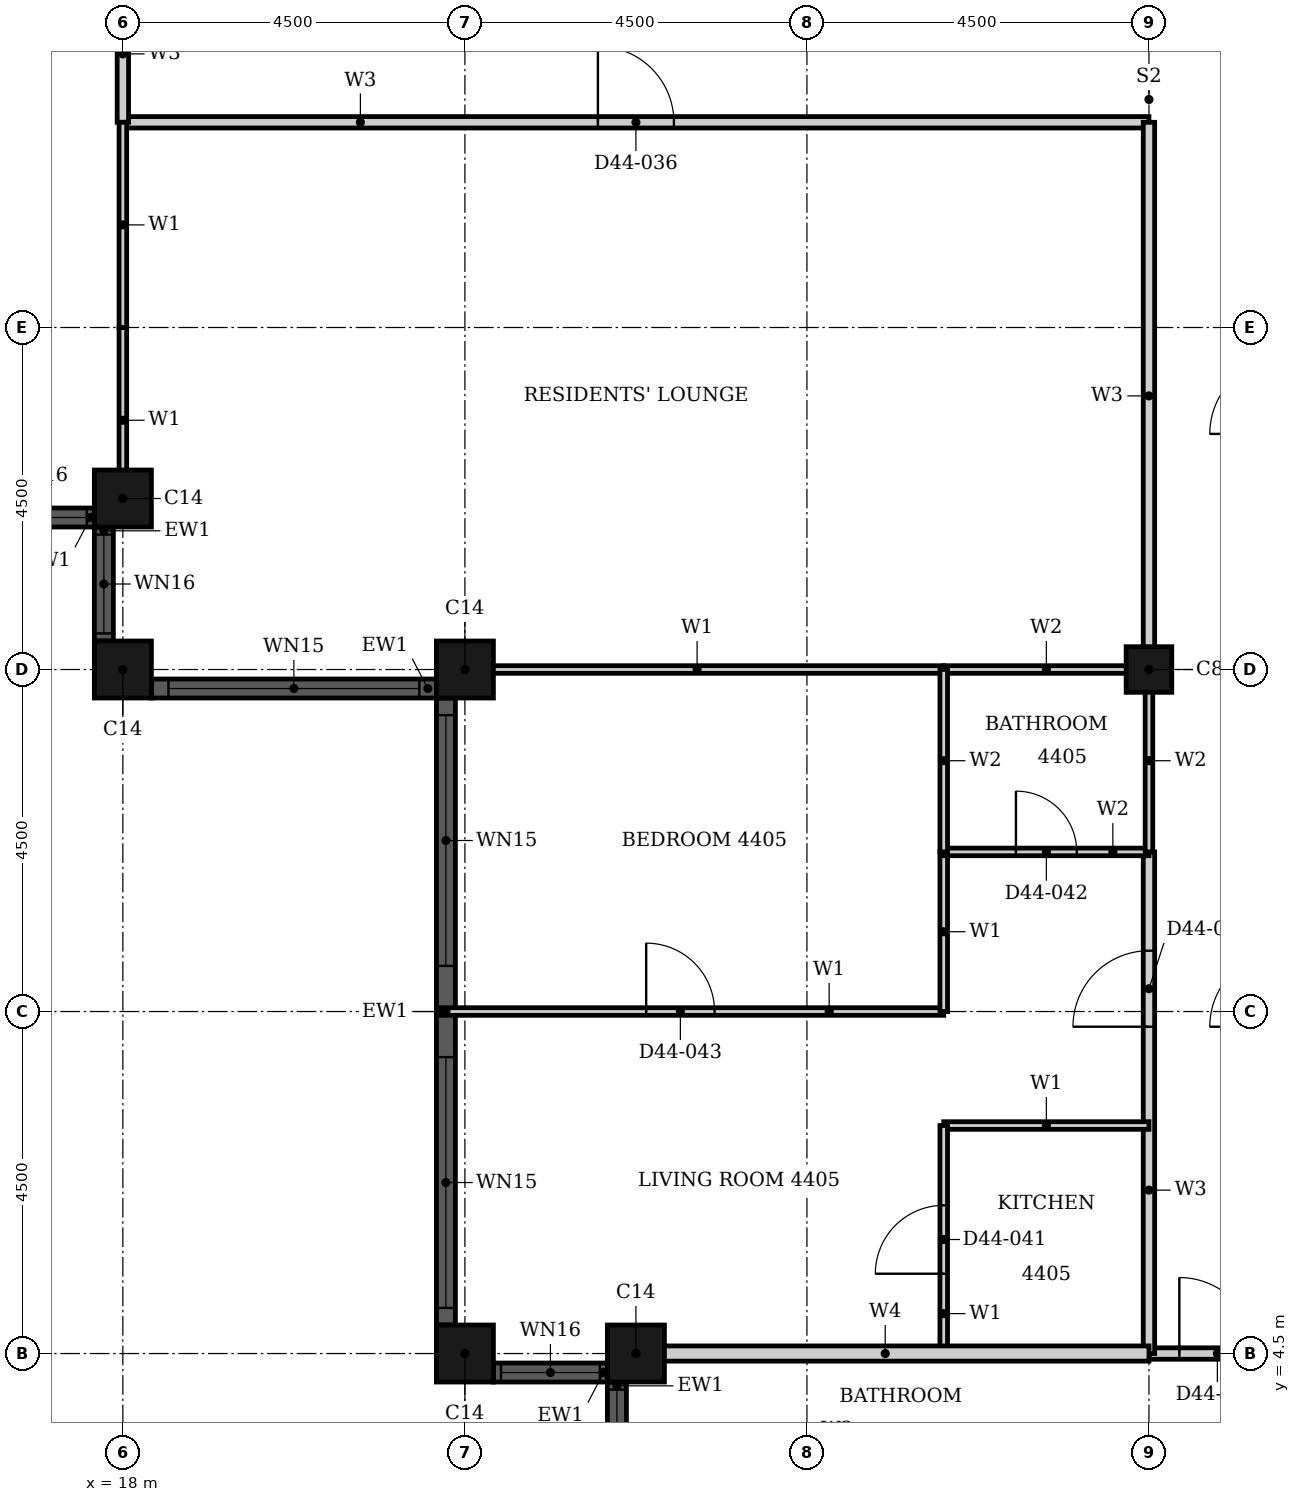
"""IFC4 building model, lengths in metres.
Left out: names, types, materials, properties, quantities, classifications, styles, units other than length and angle.
Written with IfcOpenShell. Run it as: python <this file> out.ifc"""

import sys

from ifc_helpers import new_model, si_unit, direction, frame, frame_2d, origin, origin_2d, place, context, subcontext, project, spatial, rectangle, hollow_rectangle, extrude, element, fill, save


model = new_model("IFC4")
c1 = context("Model", 3, precision=1e-05, world=origin(), true_north=direction((0.0, 1.0)))
c2 = subcontext(c1, "Body", "Model", "MODEL_VIEW")
j1 = project(units=[si_unit("LENGTHUNIT", "METRE"), si_unit("PLANEANGLEUNIT", "RADIAN")], contexts=[c1])
p1 = place(None, origin())
s1 = spatial("IfcSite", under=j1, at=p1, CompositionType="ELEMENT")
p2 = place(p1, origin())
s2 = spatial("IfcBuilding", under=s1, at=p2, CompositionType="ELEMENT")
p3 = place(p2, frame((0.0, 0.0, 176.5)))
s3 = spatial("IfcBuildingStorey", under=s2, at=p3, CompositionType="ELEMENT", Elevation=176.5)
for number, where, z_axis, x_axis in (
    (1, (22.5, 4.5, 0.0), (0.0, 0.0, 1.0), (1.0, 0.0, 0.0)),
    (2, (24.75, 4.5, 0.0), (0.0, 0.0, 1.0), (1.0, 0.0, 0.0)),
    (3, (18.0, 15.75, 0.0), (0.0, 0.0, 1.0), (1.0, 0.0, 0.0)),
    (4, (18.0, 13.5, 0.0), (0.0, 0.0, 1.0), (1.0, 0.0, 0.0)),
    (5, (22.5, 13.5, 0.0), (0.0, 0.0, 1.0), (1.0, 0.0, 0.0)),
):
    element("IfcColumn", number, at=place(p3, frame(where, z_axis=z_axis, x_axis=x_axis)), inside=s3, PredefinedType="COLUMN", context=c2, shape_type="SweptSolid", body=[
        extrude(hollow_rectangle(XDim=0.75, YDim=0.75, WallThickness=0.024, at=origin_2d()), origin(), (0.0, 0.0, 1.0), 3.7),
    ])
p4 = place(p3, frame((31.5, 13.5, 0.0), z_axis=(0.0, 0.0, 1.0), x_axis=(1.0, 0.0, 0.0)))
e6 = element("IfcColumn", 6, at=p4, inside=s3, PredefinedType="COLUMN", context=c2, shape_type="SweptSolid", body=[
    extrude(hollow_rectangle(XDim=0.6, YDim=0.6, WallThickness=0.02, at=origin_2d()), origin(), (0.0, 0.0, 1.0), 3.7),
])
p5 = place(p3, frame((22.875, 4.25, 0.0), z_axis=(0.0, 0.0, 1.0), x_axis=(1.0, 0.0, 0.0)))
e7 = element("IfcWall", 7, at=p5, inside=s3, PredefinedType="SOLIDWALL", context=c2, shape_type="SweptSolid", body=[
    extrude(rectangle(XDim=1.5, YDim=0.25, at=frame_2d((0.75, 0.0))), origin(), (0.0, 0.0, 1.0), 3.7),
])
p6 = place(p5, frame((0.1, 0.0, 0.9)))
e8 = element("IfcOpeningElement", 8, at=p6, cuts=e7, PredefinedType="OPENING", context=c2, shape_type="SweptSolid", body=[
    extrude(rectangle(XDim=1.3, YDim=1.85, at=frame_2d((0.65, 0.925))), frame((0.0, 0.135, 0.0), z_axis=(0.0, -1.0, 0.0), x_axis=(1.0, 0.0, 0.0)), (0.0, 0.0, 1.0), 0.27),
])
p7 = place(p3, frame((24.5, 4.125, 0.0), z_axis=(0.0, 0.0, 1.0), x_axis=(0.0, -1.0, 0.0)))
e9 = element("IfcWall", 9, at=p7, inside=s3, PredefinedType="SOLIDWALL", context=c2, shape_type="SweptSolid", body=[
    extrude(rectangle(XDim=1.5, YDim=0.25, at=frame_2d((0.75, 0.0))), origin(), (0.0, 0.0, 1.0), 3.7),
])
p8 = place(p7, frame((0.1, 0.0, 0.9)))
e10 = element("IfcOpeningElement", 10, at=p8, cuts=e9, PredefinedType="OPENING", context=c2, shape_type="SweptSolid", body=[
    extrude(rectangle(XDim=1.3, YDim=1.85, at=frame_2d((0.65, 0.925))), frame((0.0, 0.135, 0.0), z_axis=(0.0, -1.0, 0.0), x_axis=(1.0, 0.0, 0.0)), (0.0, 0.0, 1.0), 0.27),
])
p9 = place(p3, frame((16.125, 15.5, 0.0), z_axis=(0.0, 0.0, 1.0), x_axis=(1.0, 0.0, 0.0)))
e11 = element("IfcWall", 11, at=p9, inside=s3, PredefinedType="SOLIDWALL", context=c2, shape_type="SweptSolid", body=[
    extrude(rectangle(XDim=1.5, YDim=0.25, at=frame_2d((0.75, 0.0))), origin(), (0.0, 0.0, 1.0), 3.7),
])
p10 = place(p9, frame((0.1, 0.0, 0.9)))
e12 = element("IfcOpeningElement", 12, at=p10, cuts=e11, PredefinedType="OPENING", context=c2, shape_type="SweptSolid", body=[
    extrude(rectangle(XDim=1.3, YDim=1.85, at=frame_2d((0.65, 0.925))), frame((0.0, 0.135, 0.0), z_axis=(0.0, -1.0, 0.0), x_axis=(1.0, 0.0, 0.0)), (0.0, 0.0, 1.0), 0.27),
])
p11 = place(p3, frame((17.75, 15.375, 0.0), z_axis=(0.0, 0.0, 1.0), x_axis=(0.0, -1.0, 0.0)))
e13 = element("IfcWall", 13, at=p11, inside=s3, PredefinedType="SOLIDWALL", context=c2, shape_type="SweptSolid", body=[
    extrude(rectangle(XDim=1.5, YDim=0.25, at=frame_2d((0.75, 0.0))), origin(), (0.0, 0.0, 1.0), 3.7),
])
p12 = place(p11, frame((0.1, 0.0, 0.9)))
e14 = element("IfcOpeningElement", 14, at=p12, cuts=e13, PredefinedType="OPENING", context=c2, shape_type="SweptSolid", body=[
    extrude(rectangle(XDim=1.3, YDim=1.85, at=frame_2d((0.65, 0.925))), frame((0.0, 0.135, 0.0), z_axis=(0.0, -1.0, 0.0), x_axis=(1.0, 0.0, 0.0)), (0.0, 0.0, 1.0), 0.27),
])
p13 = place(p3, frame((18.375, 13.25, 0.0), z_axis=(0.0, 0.0, 1.0), x_axis=(1.0, 0.0, 0.0)))
e15 = element("IfcWall", 15, at=p13, inside=s3, PredefinedType="SOLIDWALL", context=c2, shape_type="SweptSolid", body=[
    extrude(rectangle(XDim=3.75, YDim=0.25, at=frame_2d((1.875, 0.0))), origin(), (0.0, 0.0, 1.0), 3.7),
])
p14 = place(p13, frame((0.225, 0.0, 0.45)))
e16 = element("IfcOpeningElement", 16, at=p14, cuts=e15, PredefinedType="OPENING", context=c2, shape_type="SweptSolid", body=[
    extrude(rectangle(XDim=3.3, YDim=2.3, at=frame_2d((1.65, 1.15))), frame((0.0, 0.135, 0.0), z_axis=(0.0, -1.0, 0.0), x_axis=(1.0, 0.0, 0.0)), (0.0, 0.0, 1.0), 0.27),
])
p15 = place(p3, frame((22.25, 13.125, 0.0), z_axis=(0.0, 0.0, 1.0), x_axis=(0.0, -1.0, 0.0)))
e17 = element("IfcWall", 17, at=p15, inside=s3, PredefinedType="SOLIDWALL", context=c2, shape_type="SweptSolid", body=[
    extrude(rectangle(XDim=8.25, YDim=0.25, at=frame_2d((4.125, 0.0))), origin(), (0.0, 0.0, 1.0), 3.7),
])
p16 = place(p15, frame((0.225, 0.0, 0.45)))
e18 = element("IfcOpeningElement", 18, at=p16, cuts=e17, PredefinedType="OPENING", context=c2, shape_type="SweptSolid", body=[
    extrude(rectangle(XDim=3.3, YDim=2.3, at=frame_2d((1.65, 1.15))), frame((0.0, 0.135, 0.0), z_axis=(0.0, -1.0, 0.0), x_axis=(1.0, 0.0, 0.0)), (0.0, 0.0, 1.0), 0.27),
])
p17 = place(p15, frame((4.725, 0.0, 0.45)))
e19 = element("IfcOpeningElement", 19, at=p17, cuts=e17, PredefinedType="OPENING", context=c2, shape_type="SweptSolid", body=[
    extrude(rectangle(XDim=3.3, YDim=2.3, at=frame_2d((1.65, 1.15))), frame((0.0, 0.135, 0.0), z_axis=(0.0, -1.0, 0.0), x_axis=(1.0, 0.0, 0.0)), (0.0, 0.0, 1.0), 0.27),
])
p18 = place(p3, frame((18.0, 20.7, 0.0), z_axis=(0.0, 0.0, 1.0), x_axis=(1.0, 0.0, 0.0)))
e20 = element("IfcWall", 20, at=p18, inside=s3, PredefinedType="PARTITIONING", context=c2, shape_type="SweptSolid", body=[
    extrude(rectangle(XDim=13.5, YDim=0.15, at=frame_2d((6.75, 0.0))), origin(), (0.0, 0.0, 1.0), 3.4),
])
p19 = place(p18, frame((6.25, 0.0, 0.0)))
e21 = element("IfcOpeningElement", 21, at=p19, cuts=e20, PredefinedType="OPENING", context=c2, shape_type="SweptSolid", body=[
    extrude(rectangle(XDim=1.0, YDim=2.1, at=frame_2d((0.5, 1.05))), frame((0.0, 0.085, 0.0), z_axis=(0.0, -1.0, 0.0), x_axis=(1.0, 0.0, 0.0)), (0.0, 0.0, 1.0), 0.17),
])
p20 = place(p3, frame((31.5, 4.5, 0.0), z_axis=(0.0, 0.0, 1.0), x_axis=(1.0, 0.0, 0.0)))
e22 = element("IfcWall", 22, at=p20, inside=s3, PredefinedType="PARTITIONING", context=c2, shape_type="SweptSolid", body=[
    extrude(rectangle(XDim=1.8, YDim=0.15, at=frame_2d((0.9, 0.0))), origin(), (0.0, 0.0, 1.0), 3.4),
])
p21 = place(p20, frame((0.4, 0.0, 0.0)))
e23 = element("IfcOpeningElement", 23, at=p21, cuts=e22, PredefinedType="OPENING", context=c2, shape_type="SweptSolid", body=[
    extrude(rectangle(XDim=1.0, YDim=2.2, at=frame_2d((0.5, 1.1))), frame((0.0, 0.085, 0.0), z_axis=(0.0, -1.0, 0.0), x_axis=(1.0, 0.0, 0.0)), (0.0, 0.0, 1.0), 0.17),
])
p22 = place(p3, frame((18.0, 20.7, 0.0), z_axis=(0.0, 0.0, 1.0), x_axis=(0.0, 1.0, 0.0)))
e24 = element("IfcWall", 24, at=p22, inside=s3, PredefinedType="PARTITIONING", context=c2, shape_type="SweptSolid", body=[
    extrude(rectangle(XDim=1.8, YDim=0.15, at=frame_2d((0.9, 0.0))), origin(), (0.0, 0.0, 1.0), 3.4),
])
p23 = place(p3, frame((31.5, 4.5, 0.0), z_axis=(0.0, 0.0, 1.0), x_axis=(0.0, 1.0, 0.0)))
e25 = element("IfcWall", 25, at=p23, inside=s3, PredefinedType="PARTITIONING", context=c2, shape_type="SweptSolid", body=[
    extrude(rectangle(XDim=6.6, YDim=0.15, at=frame_2d((3.3, 0.0))), origin(), (0.0, 0.0, 1.0), 2.68),
])
p24 = place(p23, frame((4.3, 0.0, 0.0)))
e26 = element("IfcOpeningElement", 26, at=p24, cuts=e25, PredefinedType="OPENING", context=c2, shape_type="SweptSolid", body=[
    extrude(rectangle(XDim=1.0, YDim=2.2, at=frame_2d((0.5, 1.1))), frame((0.0, 0.085, 0.0), z_axis=(0.0, -1.0, 0.0), x_axis=(1.0, 0.0, 0.0)), (0.0, 0.0, 1.0), 0.17),
])
p25 = place(p3, frame((31.5, 13.5, 0.0), z_axis=(0.0, 0.0, 1.0), x_axis=(0.0, 1.0, 0.0)))
e27 = element("IfcWall", 27, at=p25, inside=s3, PredefinedType="PARTITIONING", context=c2, shape_type="SweptSolid", body=[
    extrude(rectangle(XDim=7.2, YDim=0.15, at=frame_2d((3.6, 0.0))), origin(), (0.0, 0.0, 1.0), 3.4),
])
p26 = place(p3, frame((22.31, 13.5, 0.0), z_axis=(0.0, 0.0, 1.0), x_axis=(1.0, 0.0, 0.0)))
e28 = element("IfcWall", 28, at=p26, inside=s3, PredefinedType="PARTITIONING", context=c2, shape_type="SweptSolid", body=[
    extrude(rectangle(XDim=6.49, YDim=0.1, at=frame_2d((3.245, 0.0))), origin(), (0.0, 0.0, 1.0), 2.48),
])
p27 = place(p3, frame((28.8, 7.5, 0.0), z_axis=(0.0, 0.0, 1.0), x_axis=(1.0, 0.0, 0.0)))
e29 = element("IfcWall", 29, at=p27, inside=s3, PredefinedType="PARTITIONING", context=c2, shape_type="SweptSolid", body=[
    extrude(rectangle(XDim=2.7, YDim=0.1, at=frame_2d((1.35, 0.0))), origin(), (0.0, 0.0, 1.0), 3.4),
])
p28 = place(p3, frame((22.185, 9.0, 0.0), z_axis=(0.0, 0.0, 1.0), x_axis=(1.0, 0.0, 0.0)))
e30 = element("IfcWall", 30, at=p28, inside=s3, PredefinedType="PARTITIONING", context=c2, shape_type="SweptSolid", body=[
    extrude(rectangle(XDim=6.615, YDim=0.1, at=frame_2d((3.308, 0.0))), origin(), (0.0, 0.0, 1.0), 3.4),
])
p29 = place(p28, frame((2.7, 0.0, 0.0)))
e31 = element("IfcOpeningElement", 31, at=p29, cuts=e30, PredefinedType="OPENING", context=c2, shape_type="SweptSolid", body=[
    extrude(rectangle(XDim=0.9, YDim=2.1, at=frame_2d((0.45, 1.05))), frame((0.0, 0.06, 0.0), z_axis=(0.0, -1.0, 0.0), x_axis=(1.0, 0.0, 0.0)), (0.0, 0.0, 1.0), 0.12),
])
p30 = place(p3, frame((18.0, 15.56, 0.0), z_axis=(0.0, 0.0, 1.0), x_axis=(0.0, 1.0, 0.0)))
e32 = element("IfcWall", 32, at=p30, inside=s3, PredefinedType="PARTITIONING", context=c2, shape_type="SweptSolid", body=[
    extrude(rectangle(XDim=2.439, YDim=0.1, at=frame_2d((1.219, 0.0))), origin(), (0.0, 0.0, 1.0), 3.4),
])
p31 = place(p3, frame((18.0, 18.0, 0.0), z_axis=(0.0, 0.0, 1.0), x_axis=(0.0, 1.0, 0.0)))
e33 = element("IfcWall", 33, at=p31, inside=s3, PredefinedType="PARTITIONING", context=c2, shape_type="SweptSolid", body=[
    extrude(rectangle(XDim=2.7, YDim=0.1, at=frame_2d((1.35, 0.0))), origin(), (0.0, 0.0, 1.0), 3.4),
])
p32 = place(p3, frame((28.8, 9.0, 0.0), z_axis=(0.0, 0.0, 1.0), x_axis=(0.0, 1.0, 0.0)))
e34 = element("IfcWall", 34, at=p32, inside=s3, PredefinedType="PARTITIONING", context=c2, shape_type="SweptSolid", body=[
    extrude(rectangle(XDim=2.1, YDim=0.1, at=frame_2d((1.05, 0.0))), origin(), (0.0, 0.0, 1.0), 3.4),
])
p33 = place(p3, frame((28.8, 4.5, 0.0), z_axis=(0.0, 0.0, 1.0), x_axis=(0.0, 1.0, 0.0)))
e35 = element("IfcWall", 35, at=p33, inside=s3, PredefinedType="PARTITIONING", context=c2, shape_type="SweptSolid", body=[
    extrude(rectangle(XDim=3.0, YDim=0.1, at=frame_2d((1.5, 0.0))), origin(), (0.0, 0.0, 1.0), 3.4),
])
p34 = place(p33, frame((1.05, 0.0, 0.0)))
e36 = element("IfcOpeningElement", 36, at=p34, cuts=e35, PredefinedType="OPENING", context=c2, shape_type="SweptSolid", body=[
    extrude(rectangle(XDim=0.9, YDim=2.1, at=frame_2d((0.45, 1.05))), frame((0.0, 0.06, 0.0), z_axis=(0.0, -1.0, 0.0), x_axis=(1.0, 0.0, 0.0)), (0.0, 0.0, 1.0), 0.12),
])
p35 = place(p3, frame((24.56, 4.5, 0.0), z_axis=(0.0, 0.0, 1.0), x_axis=(1.0, 0.0, 0.0)))
e37 = element("IfcWall", 37, at=p35, inside=s3, PredefinedType="PARTITIONING", context=c2, shape_type="SweptSolid", body=[
    extrude(rectangle(XDim=6.94, YDim=0.2, at=frame_2d((3.47, 0.0))), origin(), (0.0, 0.0, 1.0), 3.4),
])
p36 = place(p3, frame((28.8, 11.1, 0.0), z_axis=(0.0, 0.0, 1.0), x_axis=(1.0, 0.0, 0.0)))
e38 = element("IfcWall", 38, at=p36, inside=s3, PredefinedType="PARTITIONING", context=c2, shape_type="SweptSolid", body=[
    extrude(rectangle(XDim=2.7, YDim=0.1, at=frame_2d((1.35, 0.0))), origin(), (0.0, 0.0, 1.0), 3.4),
])
p37 = place(p36, frame((0.95, 0.0, 0.0)))
e39 = element("IfcOpeningElement", 39, at=p37, cuts=e38, PredefinedType="OPENING", context=c2, shape_type="SweptSolid", body=[
    extrude(rectangle(XDim=0.8, YDim=2.1, at=frame_2d((0.4, 1.05))), frame((0.0, 0.06, 0.0), z_axis=(0.0, -1.0, 0.0), x_axis=(1.0, 0.0, 0.0)), (0.0, 0.0, 1.0), 0.12),
])
p38 = place(p3, frame((28.8, 13.5, 0.0), z_axis=(0.0, 0.0, 1.0), x_axis=(1.0, 0.0, 0.0)))
e40 = element("IfcWall", 40, at=p38, inside=s3, PredefinedType="PARTITIONING", context=c2, shape_type="SweptSolid", body=[
    extrude(rectangle(XDim=2.7, YDim=0.1, at=frame_2d((1.35, 0.0))), origin(), (0.0, 0.0, 1.0), 2.48),
])
p39 = place(p3, frame((28.8, 11.1, 0.0), z_axis=(0.0, 0.0, 1.0), x_axis=(0.0, 1.0, 0.0)))
e41 = element("IfcWall", 41, at=p39, inside=s3, PredefinedType="PARTITIONING", context=c2, shape_type="SweptSolid", body=[
    extrude(rectangle(XDim=2.4, YDim=0.1, at=frame_2d((1.2, 0.0))), origin(), (0.0, 0.0, 1.0), 3.4),
])
p40 = place(p3, frame((31.5, 11.1, 0.0), z_axis=(0.0, 0.0, 1.0), x_axis=(0.0, 1.0, 0.0)))
e42 = element("IfcWall", 42, at=p40, inside=s3, PredefinedType="PARTITIONING", context=c2, shape_type="SweptSolid", body=[
    extrude(rectangle(XDim=2.4, YDim=0.1, at=frame_2d((1.2, 0.0))), origin(), (0.0, 0.0, 1.0), 2.68),
])
p41 = place(p6, origin())
e43 = element("IfcWindow", 43, at=p41, inside=s3, PartitioningType="SINGLE_PANEL", PredefinedType="WINDOW", context=c2, shape_type="SweptSolid", body=[
    extrude(rectangle(XDim=1.3, YDim=1.85, at=frame_2d((0.65, 0.925))), frame((0.0, 0.03, 0.0), z_axis=(0.0, -1.0, 0.0), x_axis=(1.0, 0.0, 0.0)), (0.0, 0.0, 1.0), 0.06),
])
fill(e8, e43)
p42 = place(p8, origin())
e44 = element("IfcWindow", 44, at=p42, inside=s3, PartitioningType="SINGLE_PANEL", PredefinedType="WINDOW", context=c2, shape_type="SweptSolid", body=[
    extrude(rectangle(XDim=1.3, YDim=1.85, at=frame_2d((0.65, 0.925))), frame((0.0, 0.03, 0.0), z_axis=(0.0, -1.0, 0.0), x_axis=(1.0, 0.0, 0.0)), (0.0, 0.0, 1.0), 0.06),
])
fill(e10, e44)
p43 = place(p10, origin())
e45 = element("IfcWindow", 45, at=p43, inside=s3, PartitioningType="SINGLE_PANEL", PredefinedType="WINDOW", context=c2, shape_type="SweptSolid", body=[
    extrude(rectangle(XDim=1.3, YDim=1.85, at=frame_2d((0.65, 0.925))), frame((0.0, 0.03, 0.0), z_axis=(0.0, -1.0, 0.0), x_axis=(1.0, 0.0, 0.0)), (0.0, 0.0, 1.0), 0.06),
])
fill(e12, e45)
p44 = place(p12, origin())
e46 = element("IfcWindow", 46, at=p44, inside=s3, PartitioningType="SINGLE_PANEL", PredefinedType="WINDOW", context=c2, shape_type="SweptSolid", body=[
    extrude(rectangle(XDim=1.3, YDim=1.85, at=frame_2d((0.65, 0.925))), frame((0.0, 0.03, 0.0), z_axis=(0.0, -1.0, 0.0), x_axis=(1.0, 0.0, 0.0)), (0.0, 0.0, 1.0), 0.06),
])
fill(e14, e46)
p45 = place(p14, origin())
e47 = element("IfcWindow", 47, at=p45, inside=s3, PartitioningType="SINGLE_PANEL", PredefinedType="WINDOW", context=c2, shape_type="SweptSolid", body=[
    extrude(rectangle(XDim=3.3, YDim=2.3, at=frame_2d((1.65, 1.15))), frame((0.0, 0.03, 0.0), z_axis=(0.0, -1.0, 0.0), x_axis=(1.0, 0.0, 0.0)), (0.0, 0.0, 1.0), 0.06),
])
fill(e16, e47)
p46 = place(p16, origin())
e48 = element("IfcWindow", 48, at=p46, inside=s3, PartitioningType="SINGLE_PANEL", PredefinedType="WINDOW", context=c2, shape_type="SweptSolid", body=[
    extrude(rectangle(XDim=3.3, YDim=2.3, at=frame_2d((1.65, 1.15))), frame((0.0, 0.03, 0.0), z_axis=(0.0, -1.0, 0.0), x_axis=(1.0, 0.0, 0.0)), (0.0, 0.0, 1.0), 0.06),
])
fill(e18, e48)
p47 = place(p17, origin())
e49 = element("IfcWindow", 49, at=p47, inside=s3, PartitioningType="SINGLE_PANEL", PredefinedType="WINDOW", context=c2, shape_type="SweptSolid", body=[
    extrude(rectangle(XDim=3.3, YDim=2.3, at=frame_2d((1.65, 1.15))), frame((0.0, 0.03, 0.0), z_axis=(0.0, -1.0, 0.0), x_axis=(1.0, 0.0, 0.0)), (0.0, 0.0, 1.0), 0.06),
])
fill(e19, e49)
p48 = place(p19, origin())
e50 = element("IfcDoor", 50, at=p48, inside=s3, OperationType="SINGLE_SWING_LEFT", PredefinedType="DOOR", context=c2, shape_type="SweptSolid", body=[
    extrude(rectangle(XDim=1.0, YDim=2.1, at=frame_2d((0.5, 1.05))), frame((0.0, 0.025, 0.0), z_axis=(0.0, -1.0, 0.0), x_axis=(1.0, 0.0, 0.0)), (0.0, 0.0, 1.0), 0.05),
])
fill(e21, e50)
p49 = place(p24, origin())
e51 = element("IfcDoor", 51, at=p49, inside=s3, OperationType="SINGLE_SWING_LEFT", PredefinedType="DOOR", context=c2, shape_type="SweptSolid", body=[
    extrude(rectangle(XDim=1.0, YDim=2.2, at=frame_2d((0.5, 1.1))), frame((0.0, 0.025, 0.0), z_axis=(0.0, -1.0, 0.0), x_axis=(1.0, 0.0, 0.0)), (0.0, 0.0, 1.0), 0.05),
])
fill(e26, e51)
p50 = place(p34, origin())
e52 = element("IfcDoor", 52, at=p50, inside=s3, OperationType="SINGLE_SWING_LEFT", PredefinedType="DOOR", context=c2, shape_type="SweptSolid", body=[
    extrude(rectangle(XDim=0.9, YDim=2.1, at=frame_2d((0.45, 1.05))), frame((0.0, 0.025, 0.0), z_axis=(0.0, -1.0, 0.0), x_axis=(1.0, 0.0, 0.0)), (0.0, 0.0, 1.0), 0.05),
])
fill(e36, e52)
p51 = place(p37, origin())
e53 = element("IfcDoor", 53, at=p51, inside=s3, OperationType="SINGLE_SWING_RIGHT", PredefinedType="DOOR", context=c2, shape_type="SweptSolid", body=[
    extrude(rectangle(XDim=0.8, YDim=2.1, at=frame_2d((0.4, 1.05))), frame((0.0, 0.025, 0.0), z_axis=(0.0, -1.0, 0.0), x_axis=(1.0, 0.0, 0.0)), (0.0, 0.0, 1.0), 0.05),
])
fill(e39, e53)
p52 = place(p29, origin())
e54 = element("IfcDoor", 54, at=p52, inside=s3, OperationType="SINGLE_SWING_LEFT", PredefinedType="DOOR", context=c2, shape_type="SweptSolid", body=[
    extrude(rectangle(XDim=0.9, YDim=2.1, at=frame_2d((0.45, 1.05))), frame((0.0, 0.025, 0.0), z_axis=(0.0, -1.0, 0.0), x_axis=(1.0, 0.0, 0.0)), (0.0, 0.0, 1.0), 0.05),
])
fill(e31, e54)
p53 = place(p21, origin())
e55 = element("IfcDoor", 55, at=p53, inside=s3, OperationType="SINGLE_SWING_RIGHT", PredefinedType="DOOR", context=c2, shape_type="SweptSolid", body=[
    extrude(rectangle(XDim=1.0, YDim=2.2, at=frame_2d((0.5, 1.1))), frame((0.0, 0.025, 0.0), z_axis=(0.0, -1.0, 0.0), x_axis=(1.0, 0.0, 0.0)), (0.0, 0.0, 1.0), 0.05),
])
fill(e23, e55)
save(model, sys.argv[1])
